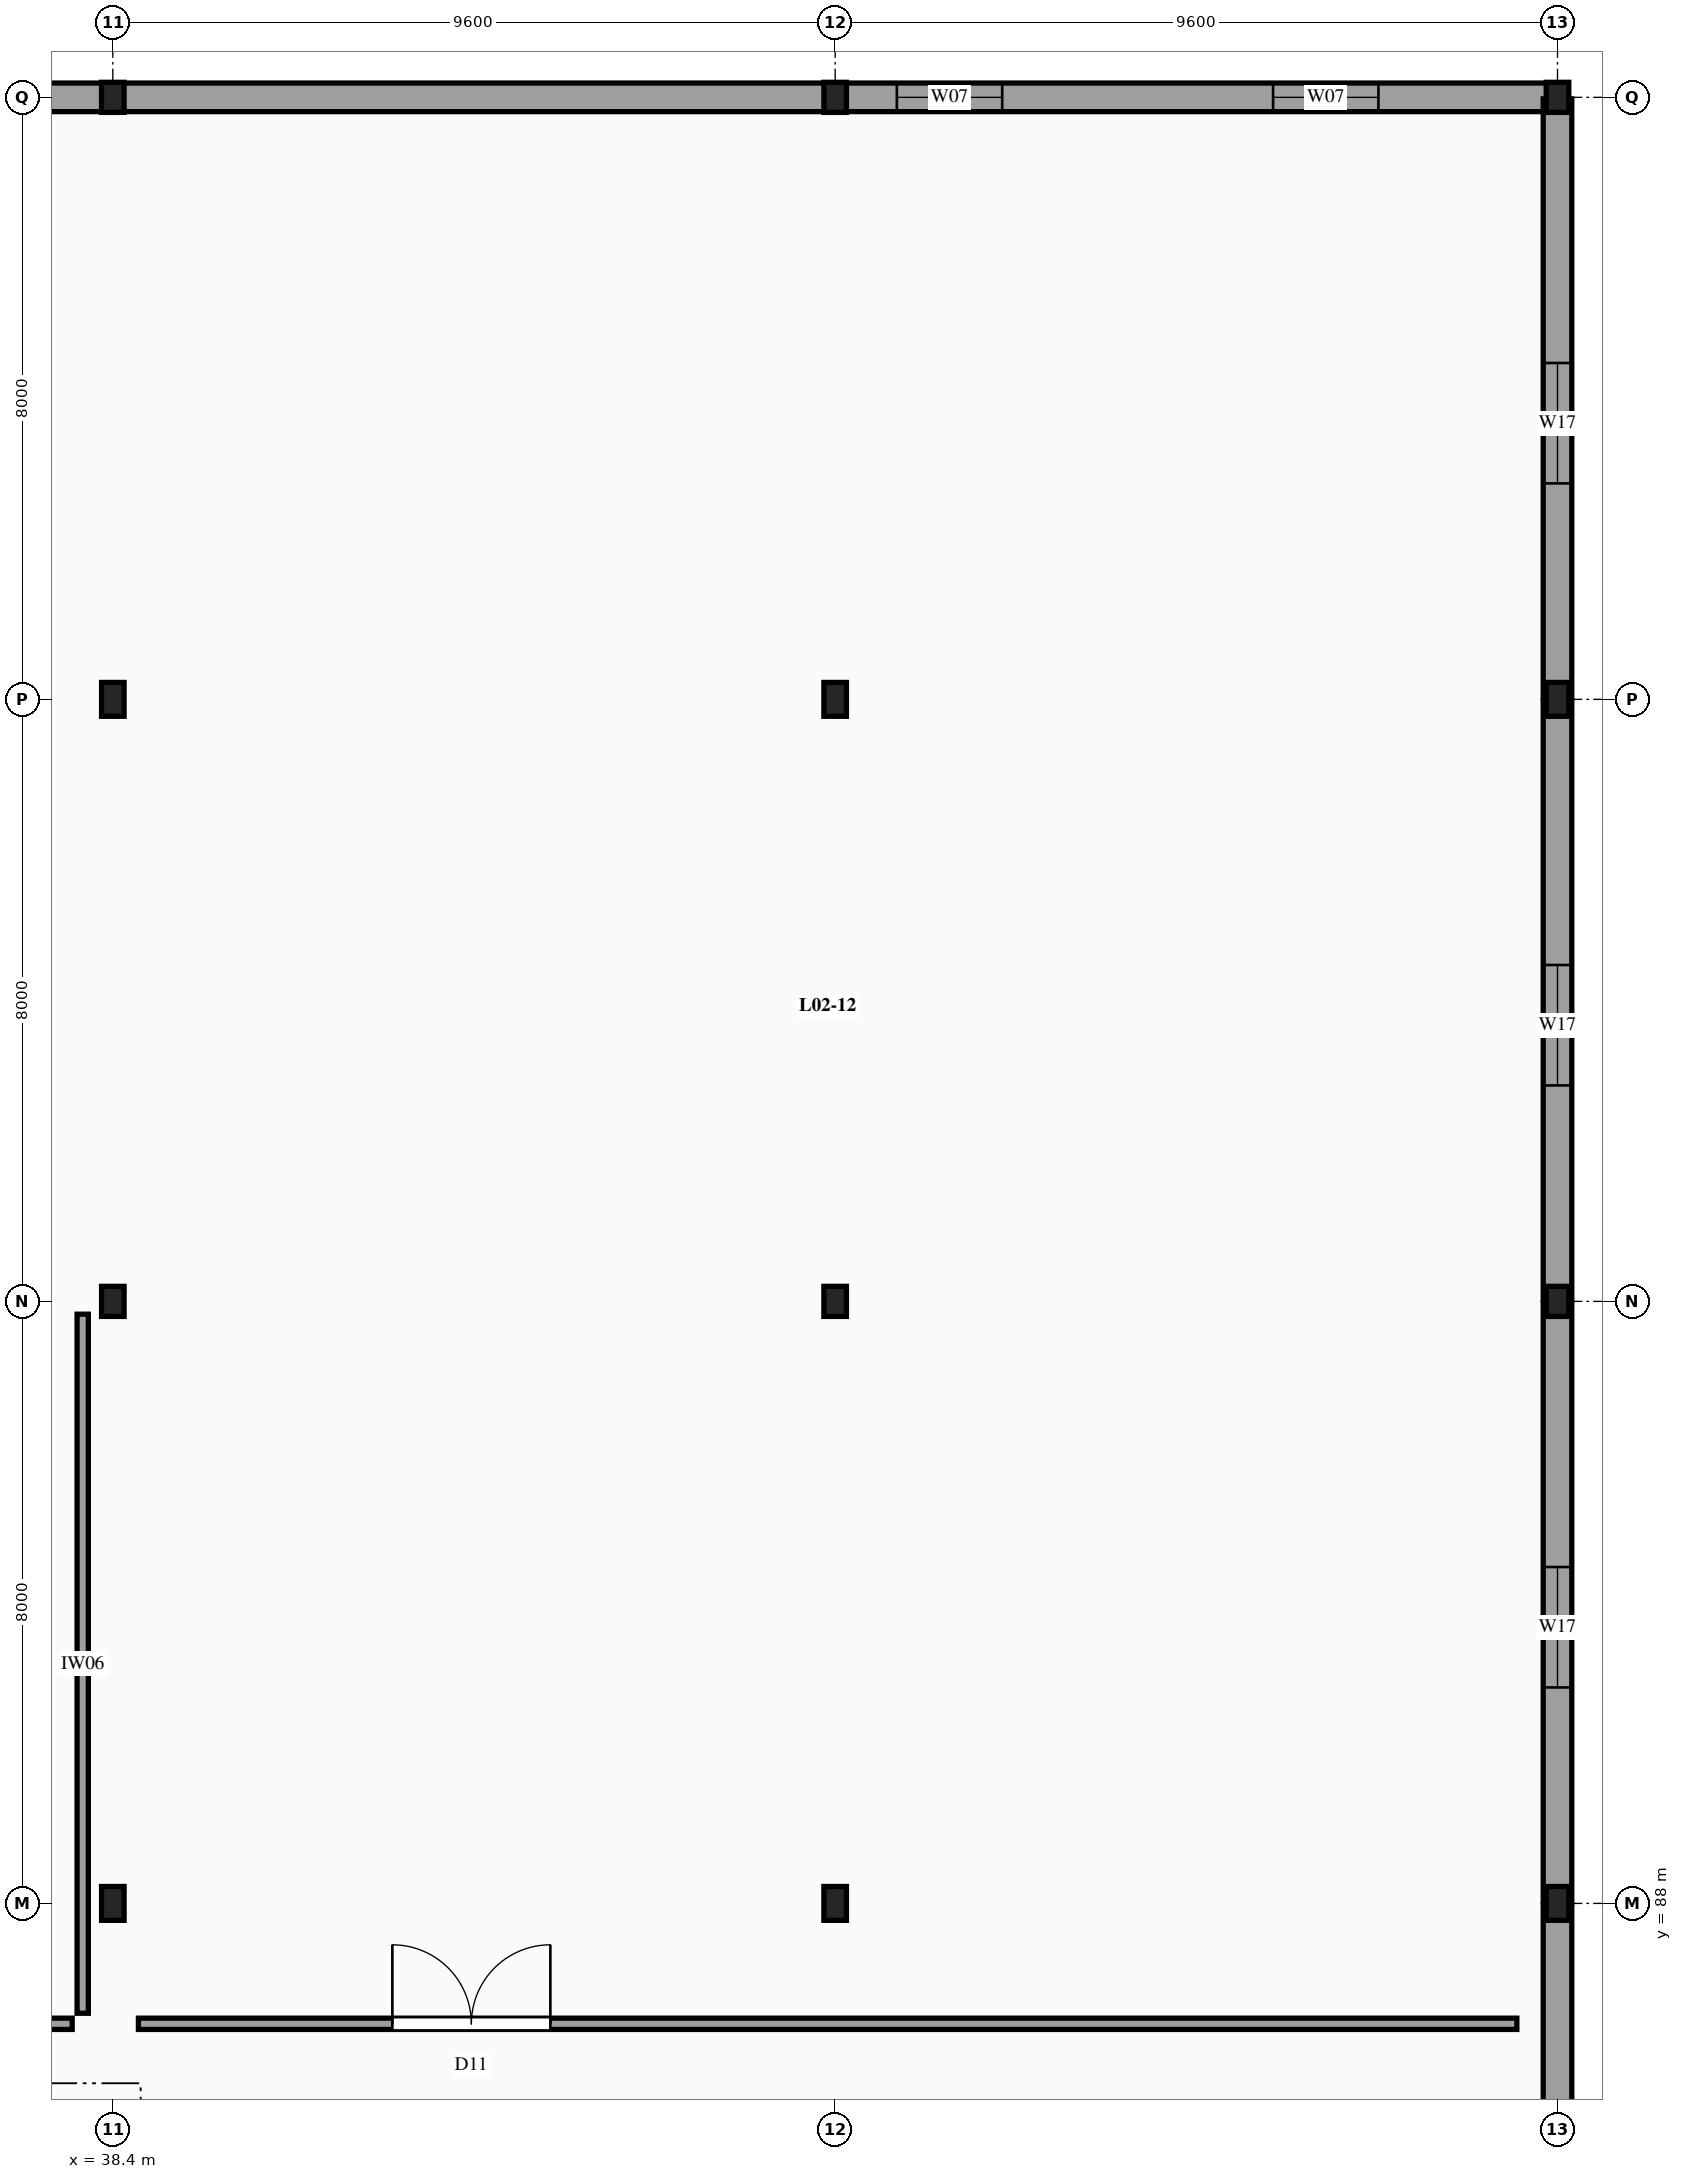
"""IFC4 building model, lengths in metres.
Left out: names, types, materials, properties, quantities, classifications, styles, units other than length and angle.
Written with IfcOpenShell. Run it as: python <this file> out.ifc"""

import sys

from ifc_helpers import new_model, si_unit, direction, frame, frame_2d, origin, origin_2d, place, context, subcontext, project, spatial, rectangle, i_section, extrude, element, fill, save


model = new_model("IFC4")
c1 = context("Model", 3, precision=1e-05, world=origin(), true_north=direction((0.0, 1.0)))
c2 = subcontext(c1, "Body", "Model", "MODEL_VIEW")
j1 = project(units=[si_unit("LENGTHUNIT", "METRE"), si_unit("PLANEANGLEUNIT", "RADIAN")], contexts=[c1])
p1 = place(None, origin())
s1 = spatial("IfcSite", under=j1, at=p1, CompositionType="ELEMENT")
p2 = place(p1, origin())
s2 = spatial("IfcBuilding", under=s1, at=p2, CompositionType="ELEMENT")
p3 = place(p2, frame((0.0, 0.0, 8.7)))
s3 = spatial("IfcBuildingStorey", under=s2, at=p3, CompositionType="ELEMENT", Elevation=8.7)
p4 = place(p3, frame((38.4, 88.0, -0.26), z_axis=(0.0, 0.0, 1.0), x_axis=(1.0, 0.0, 0.0)))
e1 = element("IfcColumn", 1, at=p4, inside=s3, PredefinedType="COLUMN", context=c2, shape_type="SweptSolid", body=[
    extrude(i_section(OverallWidth=0.3, OverallDepth=0.45, WebThickness=0.014, FlangeThickness=0.026, FilletRadius=0.027, at=origin_2d()), origin(), (0.0, 0.0, 1.0), 4.2),
])
p5 = place(p3, frame((38.4, 96.0, -0.26), z_axis=(0.0, 0.0, 1.0), x_axis=(1.0, 0.0, 0.0)))
e2 = element("IfcColumn", 2, at=p5, inside=s3, PredefinedType="COLUMN", context=c2, shape_type="SweptSolid", body=[
    extrude(i_section(OverallWidth=0.3, OverallDepth=0.4, WebThickness=0.013, FlangeThickness=0.024, FilletRadius=0.027, at=origin_2d()), origin(), (0.0, 0.0, 1.0), 4.2),
])
p6 = place(p3, frame((38.4, 104.0, -0.26), z_axis=(0.0, 0.0, 1.0), x_axis=(1.0, 0.0, 0.0)))
e3 = element("IfcColumn", 3, at=p6, inside=s3, PredefinedType="COLUMN", context=c2, shape_type="SweptSolid", body=[
    extrude(i_section(OverallWidth=0.3, OverallDepth=0.45, WebThickness=0.014, FlangeThickness=0.026, FilletRadius=0.027, at=origin_2d()), origin(), (0.0, 0.0, 1.0), 4.2),
])
p7 = place(p3, frame((38.4, 112.0, -0.26), z_axis=(0.0, 0.0, 1.0), x_axis=(1.0, 0.0, 0.0)))
e4 = element("IfcColumn", 4, at=p7, inside=s3, PredefinedType="COLUMN", context=c2, shape_type="SweptSolid", body=[
    extrude(i_section(OverallWidth=0.3, OverallDepth=0.4, WebThickness=0.013, FlangeThickness=0.024, FilletRadius=0.027, at=origin_2d()), origin(), (0.0, 0.0, 1.0), 4.2),
])
p8 = place(p3, frame((48.0, 88.0, -0.26), z_axis=(0.0, 0.0, 1.0), x_axis=(1.0, 0.0, 0.0)))
e5 = element("IfcColumn", 5, at=p8, inside=s3, PredefinedType="COLUMN", context=c2, shape_type="SweptSolid", body=[
    extrude(i_section(OverallWidth=0.3, OverallDepth=0.45, WebThickness=0.014, FlangeThickness=0.026, FilletRadius=0.027, at=origin_2d()), origin(), (0.0, 0.0, 1.0), 4.2),
])
p9 = place(p3, frame((48.0, 96.0, -0.26), z_axis=(0.0, 0.0, 1.0), x_axis=(1.0, 0.0, 0.0)))
e6 = element("IfcColumn", 6, at=p9, inside=s3, PredefinedType="COLUMN", context=c2, shape_type="SweptSolid", body=[
    extrude(i_section(OverallWidth=0.3, OverallDepth=0.4, WebThickness=0.013, FlangeThickness=0.024, FilletRadius=0.027, at=origin_2d()), origin(), (0.0, 0.0, 1.0), 4.2),
])
p10 = place(p3, frame((48.0, 104.0, -0.26), z_axis=(0.0, 0.0, 1.0), x_axis=(1.0, 0.0, 0.0)))
e7 = element("IfcColumn", 7, at=p10, inside=s3, PredefinedType="COLUMN", context=c2, shape_type="SweptSolid", body=[
    extrude(i_section(OverallWidth=0.3, OverallDepth=0.45, WebThickness=0.014, FlangeThickness=0.026, FilletRadius=0.027, at=origin_2d()), origin(), (0.0, 0.0, 1.0), 4.2),
])
p11 = place(p3, frame((48.0, 112.0, -0.26), z_axis=(0.0, 0.0, 1.0), x_axis=(1.0, 0.0, 0.0)))
e8 = element("IfcColumn", 8, at=p11, inside=s3, PredefinedType="COLUMN", context=c2, shape_type="SweptSolid", body=[
    extrude(i_section(OverallWidth=0.3, OverallDepth=0.4, WebThickness=0.013, FlangeThickness=0.024, FilletRadius=0.027, at=origin_2d()), origin(), (0.0, 0.0, 1.0), 4.2),
])
p12 = place(p3, frame((57.6, 88.0, -0.26), z_axis=(0.0, 0.0, 1.0), x_axis=(1.0, 0.0, 0.0)))
e9 = element("IfcColumn", 9, at=p12, inside=s3, PredefinedType="COLUMN", context=c2, shape_type="SweptSolid", body=[
    extrude(i_section(OverallWidth=0.3, OverallDepth=0.45, WebThickness=0.014, FlangeThickness=0.026, FilletRadius=0.027, at=origin_2d()), origin(), (0.0, 0.0, 1.0), 4.2),
])
p13 = place(p3, frame((57.6, 96.0, -0.26), z_axis=(0.0, 0.0, 1.0), x_axis=(1.0, 0.0, 0.0)))
e10 = element("IfcColumn", 10, at=p13, inside=s3, PredefinedType="COLUMN", context=c2, shape_type="SweptSolid", body=[
    extrude(i_section(OverallWidth=0.3, OverallDepth=0.4, WebThickness=0.013, FlangeThickness=0.024, FilletRadius=0.027, at=origin_2d()), origin(), (0.0, 0.0, 1.0), 4.2),
])
p14 = place(p3, frame((57.6, 104.0, -0.26), z_axis=(0.0, 0.0, 1.0), x_axis=(1.0, 0.0, 0.0)))
e11 = element("IfcColumn", 11, at=p14, inside=s3, PredefinedType="COLUMN", context=c2, shape_type="SweptSolid", body=[
    extrude(i_section(OverallWidth=0.3, OverallDepth=0.45, WebThickness=0.014, FlangeThickness=0.026, FilletRadius=0.027, at=origin_2d()), origin(), (0.0, 0.0, 1.0), 4.2),
])
p15 = place(p3, frame((57.6, 112.0, -0.26), z_axis=(0.0, 0.0, 1.0), x_axis=(1.0, 0.0, 0.0)))
e12 = element("IfcColumn", 12, at=p15, inside=s3, PredefinedType="COLUMN", context=c2, shape_type="SweptSolid", body=[
    extrude(i_section(OverallWidth=0.3, OverallDepth=0.4, WebThickness=0.013, FlangeThickness=0.024, FilletRadius=0.027, at=origin_2d()), origin(), (0.0, 0.0, 1.0), 4.2),
])
p16 = place(p3, frame((28.82, 112.0, 0.0), z_axis=(0.0, 0.0, 1.0), x_axis=(1.0, 0.0, 0.0)))
e13 = element("IfcWall", 13, at=p16, inside=s3, PredefinedType="SOLIDWALL", context=c2, shape_type="SweptSolid", body=[
    extrude(rectangle(XDim=9.56, YDim=0.38, at=frame_2d((4.78, 0.0))), origin(), (0.0, 0.0, 1.0), 3.02),
])
p17 = place(p16, frame((0.8, 0.0, 0.72)))
e14 = element("IfcOpeningElement", 14, at=p17, cuts=e13, PredefinedType="OPENING", context=c2, shape_type="SweptSolid", body=[
    extrude(rectangle(XDim=1.35, YDim=1.7, at=frame_2d((0.675, 0.85))), frame((0.0, 0.2, 0.0), z_axis=(0.0, -1.0, 0.0), x_axis=(1.0, 0.0, 0.0)), (0.0, 0.0, 1.0), 0.4),
])
p18 = place(p16, frame((5.8, 0.0, 0.72)))
e15 = element("IfcOpeningElement", 15, at=p18, cuts=e13, PredefinedType="OPENING", context=c2, shape_type="SweptSolid", body=[
    extrude(rectangle(XDim=1.35, YDim=1.7, at=frame_2d((0.675, 0.85))), frame((0.0, 0.2, 0.0), z_axis=(0.0, -1.0, 0.0), x_axis=(1.0, 0.0, 0.0)), (0.0, 0.0, 1.0), 0.4),
])
p19 = place(p3, frame((38.42, 112.0, 0.0), z_axis=(0.0, 0.0, 1.0), x_axis=(1.0, 0.0, 0.0)))
e16 = element("IfcWall", 16, at=p19, inside=s3, PredefinedType="SOLIDWALL", context=c2, shape_type="SweptSolid", body=[
    extrude(rectangle(XDim=9.56, YDim=0.38, at=frame_2d((4.78, 0.0))), origin(), (0.0, 0.0, 1.0), 3.36),
])
p20 = place(p3, frame((48.02, 112.0, 0.0), z_axis=(0.0, 0.0, 1.0), x_axis=(1.0, 0.0, 0.0)))
e17 = element("IfcWall", 17, at=p20, inside=s3, PredefinedType="SOLIDWALL", context=c2, shape_type="SweptSolid", body=[
    extrude(rectangle(XDim=9.56, YDim=0.38, at=frame_2d((4.78, 0.0))), origin(), (0.0, 0.0, 1.0), 3.36),
])
p21 = place(p20, frame((0.8, 0.0, 0.72)))
e18 = element("IfcOpeningElement", 18, at=p21, cuts=e17, PredefinedType="OPENING", context=c2, shape_type="SweptSolid", body=[
    extrude(rectangle(XDim=1.4, YDim=2.4, at=frame_2d((0.7, 1.2))), frame((0.0, 0.2, 0.0), z_axis=(0.0, -1.0, 0.0), x_axis=(1.0, 0.0, 0.0)), (0.0, 0.0, 1.0), 0.4),
])
p22 = place(p20, frame((5.8, 0.0, 0.72)))
e19 = element("IfcOpeningElement", 19, at=p22, cuts=e17, PredefinedType="OPENING", context=c2, shape_type="SweptSolid", body=[
    extrude(rectangle(XDim=1.4, YDim=2.4, at=frame_2d((0.7, 1.2))), frame((0.0, 0.2, 0.0), z_axis=(0.0, -1.0, 0.0), x_axis=(1.0, 0.0, 0.0)), (0.0, 0.0, 1.0), 0.4),
])
p23 = place(p3, frame((57.6, 80.02, 0.0), z_axis=(0.0, 0.0, 1.0), x_axis=(0.0, 1.0, 0.0)))
e20 = element("IfcWall", 20, at=p23, inside=s3, PredefinedType="SOLIDWALL", context=c2, shape_type="SweptSolid", body=[
    extrude(rectangle(XDim=7.96, YDim=0.38, at=frame_2d((3.98, 0.0))), origin(), (0.0, 0.0, 1.0), 3.36),
])
p24 = place(p23, frame((2.85, 0.0, 0.9)))
e21 = element("IfcOpeningElement", 21, at=p24, cuts=e20, PredefinedType="OPENING", context=c2, shape_type="SweptSolid", body=[
    extrude(rectangle(XDim=1.6, YDim=2.0, at=frame_2d((0.8, 1.0))), frame((0.0, 0.2, 0.0), z_axis=(0.0, -1.0, 0.0), x_axis=(1.0, 0.0, 0.0)), (0.0, 0.0, 1.0), 0.4),
])
p25 = place(p3, frame((57.6, 88.02, 0.0), z_axis=(0.0, 0.0, 1.0), x_axis=(0.0, 1.0, 0.0)))
e22 = element("IfcWall", 22, at=p25, inside=s3, PredefinedType="SOLIDWALL", context=c2, shape_type="SweptSolid", body=[
    extrude(rectangle(XDim=7.96, YDim=0.38, at=frame_2d((3.98, 0.0))), origin(), (0.0, 0.0, 1.0), 3.36),
])
p26 = place(p25, frame((2.85, 0.0, 0.9)))
e23 = element("IfcOpeningElement", 23, at=p26, cuts=e22, PredefinedType="OPENING", context=c2, shape_type="SweptSolid", body=[
    extrude(rectangle(XDim=1.6, YDim=2.0, at=frame_2d((0.8, 1.0))), frame((0.0, 0.2, 0.0), z_axis=(0.0, -1.0, 0.0), x_axis=(1.0, 0.0, 0.0)), (0.0, 0.0, 1.0), 0.4),
])
p27 = place(p3, frame((57.6, 96.02, 0.0), z_axis=(0.0, 0.0, 1.0), x_axis=(0.0, 1.0, 0.0)))
e24 = element("IfcWall", 24, at=p27, inside=s3, PredefinedType="SOLIDWALL", context=c2, shape_type="SweptSolid", body=[
    extrude(rectangle(XDim=7.96, YDim=0.38, at=frame_2d((3.98, 0.0))), origin(), (0.0, 0.0, 1.0), 3.36),
])
p28 = place(p27, frame((2.85, 0.0, 0.9)))
e25 = element("IfcOpeningElement", 25, at=p28, cuts=e24, PredefinedType="OPENING", context=c2, shape_type="SweptSolid", body=[
    extrude(rectangle(XDim=1.6, YDim=2.0, at=frame_2d((0.8, 1.0))), frame((0.0, 0.2, 0.0), z_axis=(0.0, -1.0, 0.0), x_axis=(1.0, 0.0, 0.0)), (0.0, 0.0, 1.0), 0.4),
])
p29 = place(p3, frame((57.6, 104.02, 0.0), z_axis=(0.0, 0.0, 1.0), x_axis=(0.0, 1.0, 0.0)))
e26 = element("IfcWall", 26, at=p29, inside=s3, PredefinedType="SOLIDWALL", context=c2, shape_type="SweptSolid", body=[
    extrude(rectangle(XDim=7.96, YDim=0.38, at=frame_2d((3.98, 0.0))), origin(), (0.0, 0.0, 1.0), 3.36),
])
p30 = place(p29, frame((2.85, 0.0, 0.9)))
e27 = element("IfcOpeningElement", 27, at=p30, cuts=e26, PredefinedType="OPENING", context=c2, shape_type="SweptSolid", body=[
    extrude(rectangle(XDim=1.6, YDim=2.0, at=frame_2d((0.8, 1.0))), frame((0.0, 0.2, 0.0), z_axis=(0.0, -1.0, 0.0), x_axis=(1.0, 0.0, 0.0)), (0.0, 0.0, 1.0), 0.4),
])
p31 = place(p3, frame((10.14, 86.4, 0.0), z_axis=(0.0, 0.0, 1.0), x_axis=(1.0, 0.0, 0.0)))
e28 = element("IfcWall", 28, at=p31, inside=s3, PredefinedType="PARTITIONING", context=c2, shape_type="SweptSolid", body=[
    extrude(rectangle(XDim=27.72, YDim=0.15, at=frame_2d((13.86, 0.0))), origin(), (0.0, 0.0, 1.0), 3.1),
])
p32 = place(p31, frame((22.546, 0.0, 0.0)))
e29 = element("IfcOpeningElement", 29, at=p32, cuts=e28, PredefinedType="OPENING", context=c2, shape_type="SweptSolid", body=[
    extrude(rectangle(XDim=1.85, YDim=2.5, at=frame_2d((0.925, 1.25))), frame((0.0, 0.085, 0.0), z_axis=(0.0, -1.0, 0.0), x_axis=(1.0, 0.0, 0.0)), (0.0, 0.0, 1.0), 0.17),
])
p33 = place(p3, frame((38.0, 86.54, 0.0), z_axis=(0.0, 0.0, 1.0), x_axis=(0.0, 1.0, 0.0)))
e30 = element("IfcWall", 30, at=p33, inside=s3, PredefinedType="PARTITIONING", context=c2, shape_type="SweptSolid", body=[
    extrude(rectangle(XDim=9.29, YDim=0.15, at=frame_2d((4.645, 0.0))), origin(), (0.0, 0.0, 1.0), 3.1),
])
p34 = place(p3, frame((38.74, 86.4, 0.0), z_axis=(0.0, 0.0, 1.0), x_axis=(1.0, 0.0, 0.0)))
e31 = element("IfcWall", 31, at=p34, inside=s3, PredefinedType="PARTITIONING", context=c2, shape_type="SweptSolid", body=[
    extrude(rectangle(XDim=18.32, YDim=0.15, at=frame_2d((9.16, 0.0))), origin(), (0.0, 0.0, 1.0), 3.1),
])
p35 = place(p34, frame((3.375, 0.0, 0.0)))
e32 = element("IfcOpeningElement", 32, at=p35, cuts=e31, PredefinedType="OPENING", context=c2, shape_type="SweptSolid", body=[
    extrude(rectangle(XDim=2.1, YDim=2.65, at=frame_2d((1.05, 1.325))), frame((0.0, 0.085, 0.0), z_axis=(0.0, -1.0, 0.0), x_axis=(1.0, 0.0, 0.0)), (0.0, 0.0, 1.0), 0.17),
])
p36 = place(p21, origin())
e33 = element("IfcWindow", 33, at=p36, inside=s3, PartitioningType="SINGLE_PANEL", PredefinedType="WINDOW", context=c2, shape_type="SweptSolid", body=[
    extrude(rectangle(XDim=1.4, YDim=2.4, at=frame_2d((0.7, 1.2))), frame((0.0, 0.03, 0.0), z_axis=(0.0, -1.0, 0.0), x_axis=(1.0, 0.0, 0.0)), (0.0, 0.0, 1.0), 0.06),
])
fill(e18, e33)
p37 = place(p22, origin())
e34 = element("IfcWindow", 34, at=p37, inside=s3, PartitioningType="SINGLE_PANEL", PredefinedType="WINDOW", context=c2, shape_type="SweptSolid", body=[
    extrude(rectangle(XDim=1.4, YDim=2.4, at=frame_2d((0.7, 1.2))), frame((0.0, 0.03, 0.0), z_axis=(0.0, -1.0, 0.0), x_axis=(1.0, 0.0, 0.0)), (0.0, 0.0, 1.0), 0.06),
])
fill(e19, e34)
p38 = place(p26, origin())
e35 = element("IfcWindow", 35, at=p38, inside=s3, PartitioningType="SINGLE_PANEL", PredefinedType="WINDOW", context=c2, shape_type="SweptSolid", body=[
    extrude(rectangle(XDim=1.6, YDim=2.0, at=frame_2d((0.8, 1.0))), frame((0.0, 0.03, 0.0), z_axis=(0.0, -1.0, 0.0), x_axis=(1.0, 0.0, 0.0)), (0.0, 0.0, 1.0), 0.06),
])
fill(e23, e35)
p39 = place(p28, origin())
e36 = element("IfcWindow", 36, at=p39, inside=s3, PartitioningType="SINGLE_PANEL", PredefinedType="WINDOW", context=c2, shape_type="SweptSolid", body=[
    extrude(rectangle(XDim=1.6, YDim=2.0, at=frame_2d((0.8, 1.0))), frame((0.0, 0.03, 0.0), z_axis=(0.0, -1.0, 0.0), x_axis=(1.0, 0.0, 0.0)), (0.0, 0.0, 1.0), 0.06),
])
fill(e25, e36)
p40 = place(p30, origin())
e37 = element("IfcWindow", 37, at=p40, inside=s3, PartitioningType="SINGLE_PANEL", PredefinedType="WINDOW", context=c2, shape_type="SweptSolid", body=[
    extrude(rectangle(XDim=1.6, YDim=2.0, at=frame_2d((0.8, 1.0))), frame((0.0, 0.03, 0.0), z_axis=(0.0, -1.0, 0.0), x_axis=(1.0, 0.0, 0.0)), (0.0, 0.0, 1.0), 0.06),
])
fill(e27, e37)
p41 = place(p35, origin())
e38 = element("IfcDoor", 38, at=p41, inside=s3, OperationType="DOUBLE_DOOR_SINGLE_SWING", PredefinedType="DOOR", context=c2, shape_type="SweptSolid", body=[
    extrude(rectangle(XDim=2.1, YDim=2.65, at=frame_2d((1.05, 1.325))), frame((0.0, 0.025, 0.0), z_axis=(0.0, -1.0, 0.0), x_axis=(1.0, 0.0, 0.0)), (0.0, 0.0, 1.0), 0.05),
])
fill(e32, e38)
save(model, sys.argv[1])
